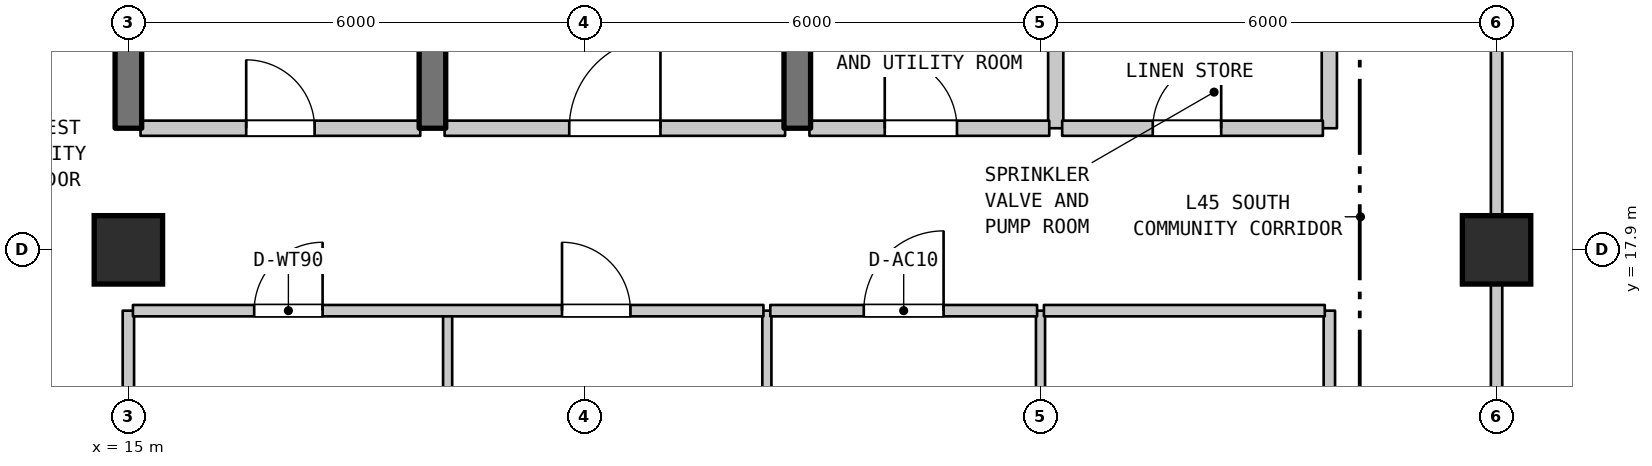
"""IFC4 building model, lengths in metres.
Left out: names, types, materials, properties, quantities, classifications, styles, units other than length and angle.
Written with IfcOpenShell. Run it as: python <this file> out.ifc"""

import sys

from ifc_helpers import new_model, si_unit, direction, frame, frame_2d, origin, origin_2d, place, context, subcontext, project, spatial, rectangle, extrude, element, fill, save


model = new_model("IFC4")
c1 = context("Model", 3, precision=1e-05, world=origin(), true_north=direction((0.0, 1.0)))
c2 = subcontext(c1, "Body", "Model", "MODEL_VIEW")
j1 = project(units=[si_unit("LENGTHUNIT", "METRE"), si_unit("PLANEANGLEUNIT", "RADIAN")], contexts=[c1])
p1 = place(None, origin())
s1 = spatial("IfcSite", under=j1, at=p1, CompositionType="ELEMENT")
p2 = place(p1, origin())
s2 = spatial("IfcBuilding", under=s1, at=p2, CompositionType="ELEMENT")
p3 = place(p2, frame((0.0, 0.0, 183.9)))
s3 = spatial("IfcBuildingStorey", under=s2, at=p3, CompositionType="ELEMENT", Elevation=183.9)
for number, where, z_axis, x_axis in (
    (1, (15.0, 17.9, 0.0), (0.0, 0.0, 1.0), (1.0, 0.0, 0.0)),
    (2, (33.0, 17.9, 0.0), (0.0, 0.0, 1.0), (1.0, 0.0, 0.0)),
):
    element("IfcColumn", number, at=place(p3, frame(where, z_axis=z_axis, x_axis=x_axis)), inside=s3, PredefinedType="COLUMN", context=c2, shape_type="SweptSolid", body=[
        extrude(rectangle(XDim=0.9, YDim=0.9, at=origin_2d()), origin(), (0.0, 0.0, 1.0), 4.5),
    ])
p4 = place(p3, frame((15.0, 13.0, 0.0), z_axis=(0.0, 0.0, 1.0), x_axis=(0.0, 1.0, 0.0)))
e3 = element("IfcWall", 3, at=p4, inside=s3, PredefinedType="STANDARD", context=c2, shape_type="SweptSolid", body=[
    extrude(rectangle(XDim=4.1, YDim=0.15, at=frame_2d((2.05, 0.0))), origin(), (0.0, 0.0, 1.0), 3.79),
])
for number, where, z_axis, x_axis in (
    (4, (15.0, 19.5, 0.0), (0.0, 0.0, 1.0), (0.0, 1.0, 0.0)),
    (5, (19.0, 19.5, 0.0), (0.0, 0.0, 1.0), (0.0, 1.0, 0.0)),
):
    element("IfcWall", number, at=place(p3, frame(where, z_axis=z_axis, x_axis=x_axis)), inside=s3, PredefinedType="SHEAR", context=c2, shape_type="SweptSolid", body=[
        extrude(rectangle(XDim=3.2, YDim=0.35, at=frame_2d((1.6, 0.0))), origin(), (0.0, 0.0, 1.0), 4.19),
    ])
for number, where, z_axis, x_axis in (
    (6, (19.2, 13.0, 0.0), (0.0, 0.0, 1.0), (0.0, 1.0, 0.0)),
    (7, (23.4, 13.0, 0.0), (0.0, 0.0, 1.0), (0.0, 1.0, 0.0)),
):
    element("IfcWall", number, at=place(p3, frame(where, z_axis=z_axis, x_axis=x_axis)), inside=s3, PredefinedType="PARTITIONING", context=c2, shape_type="SweptSolid", body=[
        extrude(rectangle(XDim=4.1, YDim=0.12, at=frame_2d((2.05, 0.0))), origin(), (0.0, 0.0, 1.0), 4.19),
    ])
p5 = place(p3, frame((23.8, 19.5, 0.0), z_axis=(0.0, 0.0, 1.0), x_axis=(0.0, 1.0, 0.0)))
e8 = element("IfcWall", 8, at=p5, inside=s3, PredefinedType="SHEAR", context=c2, shape_type="SweptSolid", body=[
    extrude(rectangle(XDim=3.2, YDim=0.35, at=frame_2d((1.6, 0.0))), origin(), (0.0, 0.0, 1.0), 4.19),
])
p6 = place(p3, frame((27.0, 14.5, 0.0), z_axis=(0.0, 0.0, 1.0), x_axis=(0.0, 1.0, 0.0)))
e9 = element("IfcWall", 9, at=p6, inside=s3, PredefinedType="PARTITIONING", context=c2, shape_type="SweptSolid", body=[
    extrude(rectangle(XDim=2.6, YDim=0.12, at=frame_2d((1.3, 0.0))), origin(), (0.0, 0.0, 1.0), 4.19),
])
p7 = place(p3, frame((27.2, 19.5, 0.0), z_axis=(0.0, 0.0, 1.0), x_axis=(0.0, 1.0, 0.0)))
e10 = element("IfcWall", 10, at=p7, inside=s3, PredefinedType="STANDARD", context=c2, shape_type="SweptSolid", body=[
    extrude(rectangle(XDim=1.6, YDim=0.2, at=frame_2d((0.8, 0.0))), origin(), (0.0, 0.0, 1.0), 4.19),
])
p8 = place(p3, frame((30.8, 14.5, 0.0), z_axis=(0.0, 0.0, 1.0), x_axis=(0.0, 1.0, 0.0)))
e11 = element("IfcWall", 11, at=p8, inside=s3, PredefinedType="STANDARD", context=c2, shape_type="SweptSolid", body=[
    extrude(rectangle(XDim=2.6, YDim=0.15, at=frame_2d((1.3, 0.0))), origin(), (0.0, 0.0, 1.0), 4.19),
])
p9 = place(p3, frame((30.8, 19.5, 0.0), z_axis=(0.0, 0.0, 1.0), x_axis=(0.0, 1.0, 0.0)))
e12 = element("IfcWall", 12, at=p9, inside=s3, PredefinedType="STANDARD", context=c2, shape_type="SweptSolid", body=[
    extrude(rectangle(XDim=1.6, YDim=0.2, at=frame_2d((0.8, 0.0))), origin(), (0.0, 0.0, 1.0), 4.19),
])
p10 = place(p3, frame((33.0, 6.7, 0.0), z_axis=(0.0, 0.0, 1.0), x_axis=(0.0, 1.0, 0.0)))
e13 = element("IfcWall", 13, at=p10, inside=s3, PredefinedType="STANDARD", context=c2, shape_type="SweptSolid", body=[
    extrude(rectangle(XDim=19.2, YDim=0.15, at=frame_2d((9.6, 0.0))), origin(), (0.0, 0.0, 1.0), 3.79),
])
p11 = place(p3, frame((15.06, 17.1, 0.0), z_axis=(0.0, 0.0, 1.0), x_axis=(1.0, 0.0, 0.0)))
e14 = element("IfcWall", 14, at=p11, inside=s3, PredefinedType="STANDARD", context=c2, shape_type="SweptSolid", body=[
    extrude(rectangle(XDim=8.295, YDim=0.15, at=frame_2d((4.147, 0.0))), origin(), (0.0, 0.0, 1.0), 4.19),
])
p12 = place(p11, frame((1.595, 0.0, 0.0)))
e15 = element("IfcOpeningElement", 15, at=p12, cuts=e14, PredefinedType="OPENING", context=c2, shape_type="SweptSolid", body=[
    extrude(rectangle(XDim=0.9, YDim=2.1, at=frame_2d((0.45, 1.05))), frame((0.0, 0.085, 0.0), z_axis=(0.0, -1.0, 0.0), x_axis=(1.0, 0.0, 0.0)), (0.0, 0.0, 1.0), 0.17),
])
p13 = place(p11, frame((5.645, 0.0, 0.0)))
e16 = element("IfcOpeningElement", 16, at=p13, cuts=e14, PredefinedType="OPENING", context=c2, shape_type="SweptSolid", body=[
    extrude(rectangle(XDim=0.9, YDim=2.1, at=frame_2d((0.45, 1.05))), frame((0.0, 0.085, 0.0), z_axis=(0.0, -1.0, 0.0), x_axis=(1.0, 0.0, 0.0)), (0.0, 0.0, 1.0), 0.17),
])
p14 = place(p3, frame((23.445, 17.1, 0.0), z_axis=(0.0, 0.0, 1.0), x_axis=(1.0, 0.0, 0.0)))
e17 = element("IfcWall", 17, at=p14, inside=s3, PredefinedType="STANDARD", context=c2, shape_type="SweptSolid", body=[
    extrude(rectangle(XDim=3.51, YDim=0.15, at=frame_2d((1.755, 0.0))), origin(), (0.0, 0.0, 1.0), 4.19),
])
p15 = place(p14, frame((1.23, 0.0, 0.0)))
e18 = element("IfcOpeningElement", 18, at=p15, cuts=e17, PredefinedType="OPENING", context=c2, shape_type="SweptSolid", body=[
    extrude(rectangle(XDim=1.05, YDim=2.15, at=frame_2d((0.525, 1.075))), frame((0.0, 0.085, 0.0), z_axis=(0.0, -1.0, 0.0), x_axis=(1.0, 0.0, 0.0)), (0.0, 0.0, 1.0), 0.17),
])
p16 = place(p3, frame((27.045, 17.1, 0.0), z_axis=(0.0, 0.0, 1.0), x_axis=(1.0, 0.0, 0.0)))
e19 = element("IfcWall", 19, at=p16, inside=s3, PredefinedType="STANDARD", context=c2, shape_type="SweptSolid", body=[
    extrude(rectangle(XDim=3.695, YDim=0.15, at=frame_2d((1.848, 0.0))), origin(), (0.0, 0.0, 1.0), 4.19),
])
p17 = place(p3, frame((15.16, 19.5, 0.0), z_axis=(0.0, 0.0, 1.0), x_axis=(1.0, 0.0, 0.0)))
e20 = element("IfcWall", 20, at=p17, inside=s3, PredefinedType="STANDARD", context=c2, shape_type="SweptSolid", body=[
    extrude(rectangle(XDim=3.68, YDim=0.2, at=frame_2d((1.84, 0.0))), origin(), (0.0, 0.0, 1.0), 4.19),
])
p18 = place(p17, frame((1.39, 0.0, 0.0)))
e21 = element("IfcOpeningElement", 21, at=p18, cuts=e20, PredefinedType="OPENING", context=c2, shape_type="SweptSolid", body=[
    extrude(rectangle(XDim=0.9, YDim=2.15, at=frame_2d((0.45, 1.075))), frame((0.0, 0.11, 0.0), z_axis=(0.0, -1.0, 0.0), x_axis=(1.0, 0.0, 0.0)), (0.0, 0.0, 1.0), 0.22),
])
p19 = place(p3, frame((19.16, 19.5, 0.0), z_axis=(0.0, 0.0, 1.0), x_axis=(1.0, 0.0, 0.0)))
e22 = element("IfcWall", 22, at=p19, inside=s3, PredefinedType="STANDARD", context=c2, shape_type="SweptSolid", body=[
    extrude(rectangle(XDim=4.48, YDim=0.2, at=frame_2d((2.24, 0.0))), origin(), (0.0, 0.0, 1.0), 4.19),
])
p20 = place(p19, frame((1.64, 0.0, 0.0)))
e23 = element("IfcOpeningElement", 23, at=p20, cuts=e22, PredefinedType="OPENING", context=c2, shape_type="SweptSolid", body=[
    extrude(rectangle(XDim=1.2, YDim=2.2, at=frame_2d((0.6, 1.1))), frame((0.0, 0.11, 0.0), z_axis=(0.0, -1.0, 0.0), x_axis=(1.0, 0.0, 0.0)), (0.0, 0.0, 1.0), 0.22),
])
p21 = place(p3, frame((23.96, 19.5, 0.0), z_axis=(0.0, 0.0, 1.0), x_axis=(1.0, 0.0, 0.0)))
e24 = element("IfcWall", 24, at=p21, inside=s3, PredefinedType="STANDARD", context=c2, shape_type="SweptSolid", body=[
    extrude(rectangle(XDim=3.155, YDim=0.2, at=frame_2d((1.578, 0.0))), origin(), (0.0, 0.0, 1.0), 4.19),
])
p22 = place(p21, frame((0.991, 0.0, 0.0)))
e25 = element("IfcOpeningElement", 25, at=p22, cuts=e24, PredefinedType="OPENING", context=c2, shape_type="SweptSolid", body=[
    extrude(rectangle(XDim=0.95, YDim=2.15, at=frame_2d((0.475, 1.075))), frame((0.0, 0.11, 0.0), z_axis=(0.0, -1.0, 0.0), x_axis=(1.0, 0.0, 0.0)), (0.0, 0.0, 1.0), 0.22),
])
p23 = place(p3, frame((27.285, 19.5, 0.0), z_axis=(0.0, 0.0, 1.0), x_axis=(1.0, 0.0, 0.0)))
e26 = element("IfcWall", 26, at=p23, inside=s3, PredefinedType="STANDARD", context=c2, shape_type="SweptSolid", body=[
    extrude(rectangle(XDim=3.43, YDim=0.2, at=frame_2d((1.715, 0.0))), origin(), (0.0, 0.0, 1.0), 4.19),
])
p24 = place(p23, frame((1.192, 0.0, 0.0)))
e27 = element("IfcOpeningElement", 27, at=p24, cuts=e26, PredefinedType="OPENING", context=c2, shape_type="SweptSolid", body=[
    extrude(rectangle(XDim=0.9, YDim=2.15, at=frame_2d((0.45, 1.075))), frame((0.0, 0.11, 0.0), z_axis=(0.0, -1.0, 0.0), x_axis=(1.0, 0.0, 0.0)), (0.0, 0.0, 1.0), 0.22),
])
p25 = place(p12, origin())
e28 = element("IfcDoor", 28, at=p25, inside=s3, OperationType="SINGLE_SWING_RIGHT", PredefinedType="DOOR", context=c2, shape_type="SweptSolid", body=[
    extrude(rectangle(XDim=0.9, YDim=2.1, at=frame_2d((0.45, 1.05))), frame((0.0, 0.025, 0.0), z_axis=(0.0, -1.0, 0.0), x_axis=(1.0, 0.0, 0.0)), (0.0, 0.0, 1.0), 0.05),
])
fill(e15, e28)
p26 = place(p13, origin())
e29 = element("IfcDoor", 29, at=p26, inside=s3, OperationType="SINGLE_SWING_LEFT", PredefinedType="DOOR", context=c2, shape_type="SweptSolid", body=[
    extrude(rectangle(XDim=0.9, YDim=2.1, at=frame_2d((0.45, 1.05))), frame((0.0, 0.025, 0.0), z_axis=(0.0, -1.0, 0.0), x_axis=(1.0, 0.0, 0.0)), (0.0, 0.0, 1.0), 0.05),
])
fill(e16, e29)
p27 = place(p15, origin())
e30 = element("IfcDoor", 30, at=p27, inside=s3, OperationType="SINGLE_SWING_RIGHT", PredefinedType="DOOR", context=c2, shape_type="SweptSolid", body=[
    extrude(rectangle(XDim=1.05, YDim=2.15, at=frame_2d((0.525, 1.075))), frame((0.0, 0.025, 0.0), z_axis=(0.0, -1.0, 0.0), x_axis=(1.0, 0.0, 0.0)), (0.0, 0.0, 1.0), 0.05),
])
fill(e18, e30)
p28 = place(p18, origin())
e31 = element("IfcDoor", 31, at=p28, inside=s3, OperationType="SINGLE_SWING_LEFT", PredefinedType="DOOR", context=c2, shape_type="SweptSolid", body=[
    extrude(rectangle(XDim=0.9, YDim=2.15, at=frame_2d((0.45, 1.075))), frame((0.0, 0.025, 0.0), z_axis=(0.0, -1.0, 0.0), x_axis=(1.0, 0.0, 0.0)), (0.0, 0.0, 1.0), 0.05),
])
fill(e21, e31)
p29 = place(p20, origin())
e32 = element("IfcDoor", 32, at=p29, inside=s3, OperationType="SINGLE_SWING_RIGHT", PredefinedType="DOOR", context=c2, shape_type="SweptSolid", body=[
    extrude(rectangle(XDim=1.2, YDim=2.2, at=frame_2d((0.6, 1.1))), frame((0.0, 0.025, 0.0), z_axis=(0.0, -1.0, 0.0), x_axis=(1.0, 0.0, 0.0)), (0.0, 0.0, 1.0), 0.05),
])
fill(e23, e32)
p30 = place(p22, origin())
e33 = element("IfcDoor", 33, at=p30, inside=s3, OperationType="SINGLE_SWING_LEFT", PredefinedType="DOOR", context=c2, shape_type="SweptSolid", body=[
    extrude(rectangle(XDim=0.95, YDim=2.15, at=frame_2d((0.475, 1.075))), frame((0.0, 0.025, 0.0), z_axis=(0.0, -1.0, 0.0), x_axis=(1.0, 0.0, 0.0)), (0.0, 0.0, 1.0), 0.05),
])
fill(e25, e33)
p31 = place(p24, origin())
e34 = element("IfcDoor", 34, at=p31, inside=s3, OperationType="SINGLE_SWING_RIGHT", PredefinedType="DOOR", context=c2, shape_type="SweptSolid", body=[
    extrude(rectangle(XDim=0.9, YDim=2.15, at=frame_2d((0.45, 1.075))), frame((0.0, 0.025, 0.0), z_axis=(0.0, -1.0, 0.0), x_axis=(1.0, 0.0, 0.0)), (0.0, 0.0, 1.0), 0.05),
])
fill(e27, e34)
save(model, sys.argv[1])
